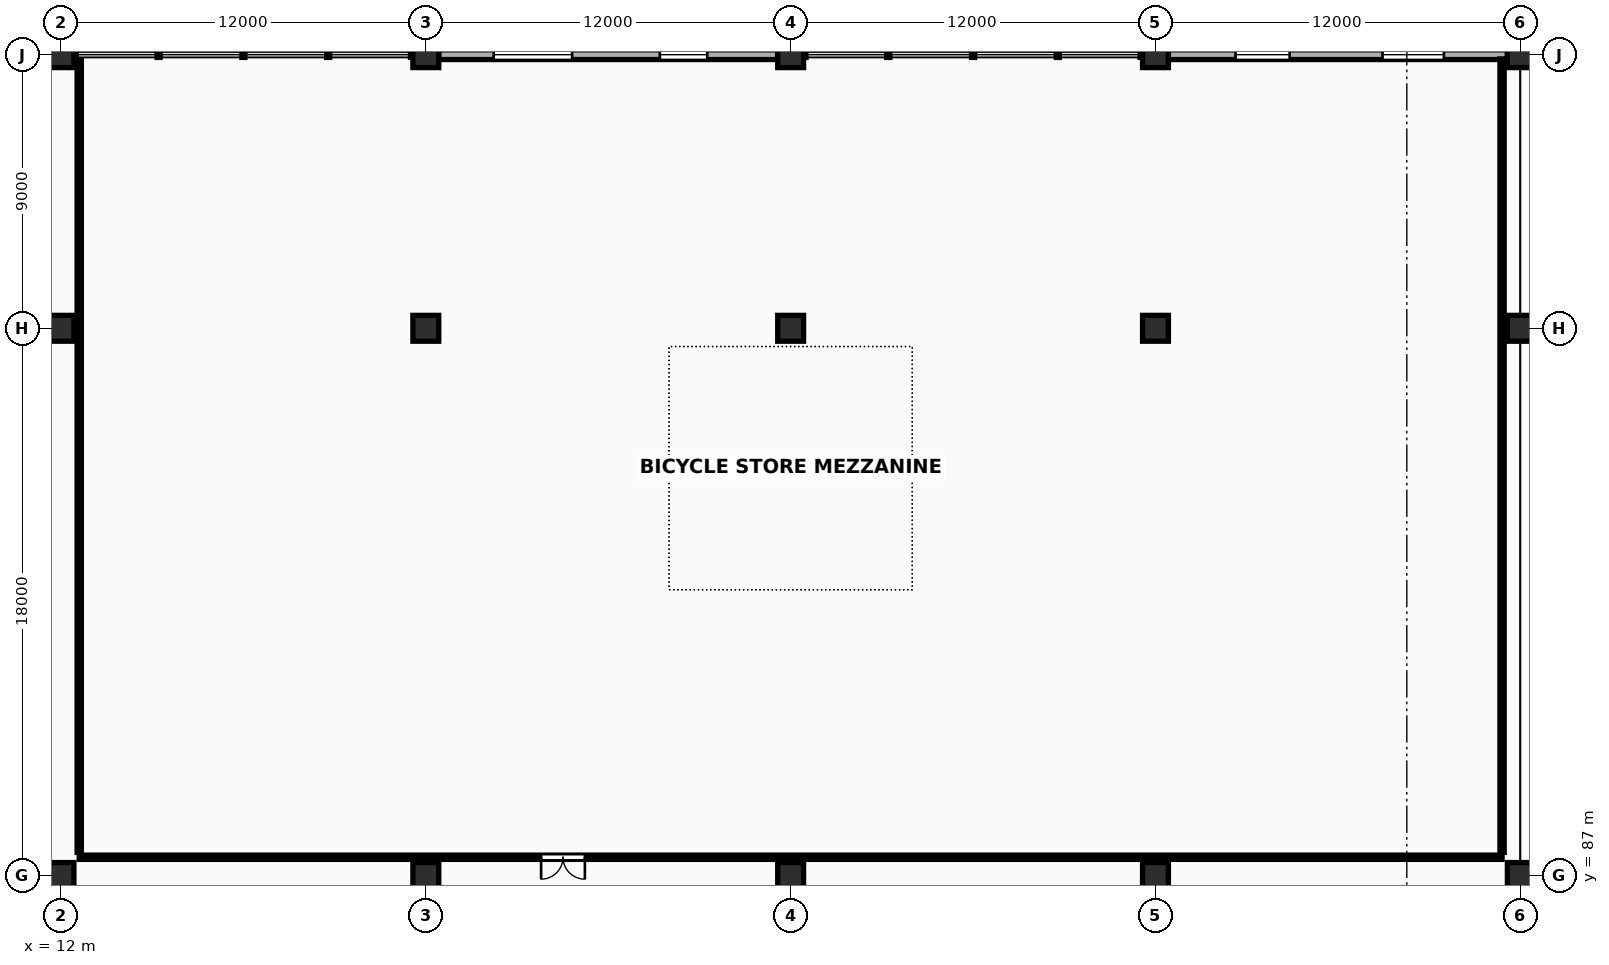
"""IFC4 building model, lengths in metres.
Left out: names, types, materials, properties, quantities, classifications, styles, units other than length and angle.
Written with IfcOpenShell. Run it as: python <this file> out.ifc"""

import sys

from ifc_helpers import new_model, si_unit, direction, frame, frame_2d, origin, origin_2d, place, context, subcontext, project, spatial, rectangle, extrude, element, fill, save


model = new_model("IFC4")
c1 = context("Model", 3, precision=1e-05, world=origin(), true_north=direction((0.0, 1.0)))
c2 = subcontext(c1, "Body", "Model", "MODEL_VIEW")
j1 = project(units=[si_unit("LENGTHUNIT", "METRE"), si_unit("PLANEANGLEUNIT", "RADIAN")], contexts=[c1])
p1 = place(None, origin())
s1 = spatial("IfcSite", under=j1, at=p1, CompositionType="ELEMENT")
p2 = place(p1, origin())
s2 = spatial("IfcBuilding", under=s1, at=p2, CompositionType="ELEMENT")
p3 = place(p2, frame((0.0, 0.0, 5.4)))
s3 = spatial("IfcBuildingStorey", under=s2, at=p3, CompositionType="ELEMENT", Elevation=5.4)
for number, where, z_axis, x_axis in (
    (1, (12.0, 87.0, 0.0), (0.0, 0.0, 1.0), (1.0, 0.0, 0.0)),
    (2, (12.0, 105.0, 0.0), (0.0, 0.0, 1.0), (1.0, 0.0, 0.0)),
    (3, (12.0, 114.0, 0.0), (0.0, 0.0, 1.0), (1.0, 0.0, 0.0)),
    (4, (24.0, 87.0, 0.0), (0.0, 0.0, 1.0), (1.0, 0.0, 0.0)),
    (5, (24.0, 105.0, 0.0), (0.0, 0.0, 1.0), (1.0, 0.0, 0.0)),
    (6, (24.0, 114.0, 0.0), (0.0, 0.0, 1.0), (1.0, 0.0, 0.0)),
    (7, (36.0, 87.0, 0.0), (0.0, 0.0, 1.0), (1.0, 0.0, 0.0)),
    (8, (36.0, 105.0, 0.0), (0.0, 0.0, 1.0), (1.0, 0.0, 0.0)),
    (9, (36.0, 114.0, 0.0), (0.0, 0.0, 1.0), (1.0, 0.0, 0.0)),
    (10, (48.0, 87.0, 0.0), (0.0, 0.0, 1.0), (1.0, 0.0, 0.0)),
    (11, (48.0, 105.0, 0.0), (0.0, 0.0, 1.0), (1.0, 0.0, 0.0)),
    (12, (48.0, 114.0, 0.0), (0.0, 0.0, 1.0), (1.0, 0.0, 0.0)),
    (13, (60.0, 87.0, 0.0), (0.0, 0.0, 1.0), (1.0, 0.0, 0.0)),
    (14, (60.0, 105.0, 0.0), (0.0, 0.0, 1.0), (1.0, 0.0, 0.0)),
    (15, (60.0, 114.0, 0.0), (0.0, 0.0, 1.0), (1.0, 0.0, 0.0)),
):
    element("IfcColumn", number, at=place(p3, frame(where, z_axis=z_axis, x_axis=x_axis)), inside=s3, PredefinedType="COLUMN", context=c2, shape_type="SweptSolid", body=[
        extrude(rectangle(XDim=0.85, YDim=0.85, at=origin_2d()), origin(), (0.0, 0.0, 1.0), 4.2),
    ])
p4 = place(p3, frame((24.423, 114.0, 0.0), z_axis=(0.0, 0.0, 1.0), x_axis=(1.0, 0.0, 0.0)))
e16 = element("IfcWall", 16, at=p4, inside=s3, PredefinedType="SOLIDWALL", context=c2, shape_type="SweptSolid", body=[
    extrude(rectangle(XDim=11.154, YDim=0.32, at=frame_2d((5.577, 0.0))), origin(), (0.0, 0.0, 1.0), 2.69),
])
p5 = place(p4, frame((1.81, 0.0, 0.55)))
e17 = element("IfcOpeningElement", 17, at=p5, cuts=e16, PredefinedType="OPENING", context=c2, shape_type="SweptSolid", body=[
    extrude(rectangle(XDim=2.58, YDim=1.74, at=frame_2d((1.29, 0.87))), frame((0.0, 0.175, 0.0), z_axis=(0.0, -1.0, 0.0), x_axis=(1.0, 0.0, 0.0)), (0.0, 0.0, 1.0), 0.35),
])
p6 = place(p4, frame((7.274, 0.0, 0.55)))
e18 = element("IfcOpeningElement", 18, at=p6, cuts=e16, PredefinedType="OPENING", context=c2, shape_type="SweptSolid", body=[
    extrude(rectangle(XDim=1.56, YDim=1.9, at=frame_2d((0.78, 0.95))), frame((0.0, 0.175, 0.0), z_axis=(0.0, -1.0, 0.0), x_axis=(1.0, 0.0, 0.0)), (0.0, 0.0, 1.0), 0.35),
])
p7 = place(p3, frame((48.423, 114.0, 0.0), z_axis=(0.0, 0.0, 1.0), x_axis=(1.0, 0.0, 0.0)))
e19 = element("IfcWall", 19, at=p7, inside=s3, PredefinedType="SOLIDWALL", context=c2, shape_type="SweptSolid", body=[
    extrude(rectangle(XDim=11.154, YDim=0.32, at=frame_2d((5.577, 0.0))), origin(), (0.0, 0.0, 1.0), 2.69),
])
p8 = place(p7, frame((2.21, 0.0, 0.55)))
e20 = element("IfcOpeningElement", 20, at=p8, cuts=e19, PredefinedType="OPENING", context=c2, shape_type="SweptSolid", body=[
    extrude(rectangle(XDim=1.78, YDim=1.9, at=frame_2d((0.89, 0.95))), frame((0.0, 0.175, 0.0), z_axis=(0.0, -1.0, 0.0), x_axis=(1.0, 0.0, 0.0)), (0.0, 0.0, 1.0), 0.35),
])
p9 = place(p7, frame((7.044, 0.0, 0.55)))
e21 = element("IfcOpeningElement", 21, at=p9, cuts=e19, PredefinedType="OPENING", context=c2, shape_type="SweptSolid", body=[
    extrude(rectangle(XDim=2.02, YDim=1.9, at=frame_2d((1.01, 0.95))), frame((0.0, 0.175, 0.0), z_axis=(0.0, -1.0, 0.0), x_axis=(1.0, 0.0, 0.0)), (0.0, 0.0, 1.0), 0.35),
])
p10 = place(p3, frame((12.6, 87.6, 0.0), z_axis=(0.0, 0.0, 1.0), x_axis=(1.0, 0.0, 0.0)))
e22 = element("IfcWall", 22, at=p10, inside=s3, PredefinedType="PARTITIONING", context=c2, shape_type="SweptSolid", body=[
    extrude(rectangle(XDim=46.8, YDim=0.14, at=frame_2d((23.4, 0.0))), origin(), (0.0, 0.0, 1.0), 2.75),
])
p11 = place(p10, frame((15.192, 0.0, 0.0)))
e23 = element("IfcOpeningElement", 23, at=p11, cuts=e22, PredefinedType="OPENING", context=c2, shape_type="SweptSolid", body=[
    extrude(rectangle(XDim=1.44, YDim=2.26, at=frame_2d((0.72, 1.13))), frame((0.0, 0.085, 0.0), z_axis=(0.0, -1.0, 0.0), x_axis=(1.0, 0.0, 0.0)), (0.0, 0.0, 1.0), 0.17),
])
for number, where, z_axis, x_axis in (
    (24, (12.6, 87.76, 0.0), (0.0, 0.0, 1.0), (0.0, 1.0, 0.0)),
    (25, (59.4, 87.76, 0.0), (0.0, 0.0, 1.0), (0.0, 1.0, 0.0)),
):
    element("IfcWall", number, at=place(p3, frame(where, z_axis=z_axis, x_axis=x_axis)), inside=s3, PredefinedType="PARTITIONING", context=c2, shape_type="SweptSolid", body=[
        extrude(rectangle(XDim=26.1, YDim=0.14, at=frame_2d((13.05, 0.0))), origin(), (0.0, 0.0, 1.0), 2.75),
    ])
p12 = place(p5, origin())
e26 = element("IfcWindow", 26, at=p12, inside=s3, PartitioningType="DOUBLE_PANEL_VERTICAL", PredefinedType="WINDOW", context=c2, shape_type="SweptSolid", body=[
    extrude(rectangle(XDim=2.58, YDim=1.74, at=frame_2d((1.29, 0.87))), frame((0.0, 0.03, 0.0), z_axis=(0.0, -1.0, 0.0), x_axis=(1.0, 0.0, 0.0)), (0.0, 0.0, 1.0), 0.06),
])
fill(e17, e26)
p13 = place(p6, origin())
e27 = element("IfcWindow", 27, at=p13, inside=s3, PartitioningType="SINGLE_PANEL", PredefinedType="WINDOW", context=c2, shape_type="SweptSolid", body=[
    extrude(rectangle(XDim=1.56, YDim=1.9, at=frame_2d((0.78, 0.95))), frame((0.0, 0.03, 0.0), z_axis=(0.0, -1.0, 0.0), x_axis=(1.0, 0.0, 0.0)), (0.0, 0.0, 1.0), 0.06),
])
fill(e18, e27)
p14 = place(p8, origin())
e28 = element("IfcWindow", 28, at=p14, inside=s3, PartitioningType="SINGLE_PANEL", PredefinedType="WINDOW", context=c2, shape_type="SweptSolid", body=[
    extrude(rectangle(XDim=1.78, YDim=1.9, at=frame_2d((0.89, 0.95))), frame((0.0, 0.03, 0.0), z_axis=(0.0, -1.0, 0.0), x_axis=(1.0, 0.0, 0.0)), (0.0, 0.0, 1.0), 0.06),
])
fill(e20, e28)
p15 = place(p9, origin())
e29 = element("IfcWindow", 29, at=p15, inside=s3, PartitioningType="DOUBLE_PANEL_VERTICAL", PredefinedType="WINDOW", context=c2, shape_type="SweptSolid", body=[
    extrude(rectangle(XDim=2.02, YDim=1.9, at=frame_2d((1.01, 0.95))), frame((0.0, 0.03, 0.0), z_axis=(0.0, -1.0, 0.0), x_axis=(1.0, 0.0, 0.0)), (0.0, 0.0, 1.0), 0.06),
])
fill(e21, e29)
p16 = place(p11, origin())
e30 = element("IfcDoor", 30, at=p16, inside=s3, OperationType="DOUBLE_DOOR_SINGLE_SWING", PredefinedType="DOOR", context=c2, shape_type="SweptSolid", body=[
    extrude(rectangle(XDim=1.44, YDim=2.26, at=frame_2d((0.72, 1.13))), frame((0.0, 0.025, 0.0), z_axis=(0.0, -1.0, 0.0), x_axis=(1.0, 0.0, 0.0)), (0.0, 0.0, 1.0), 0.05),
])
fill(e23, e30)
save(model, sys.argv[1])
